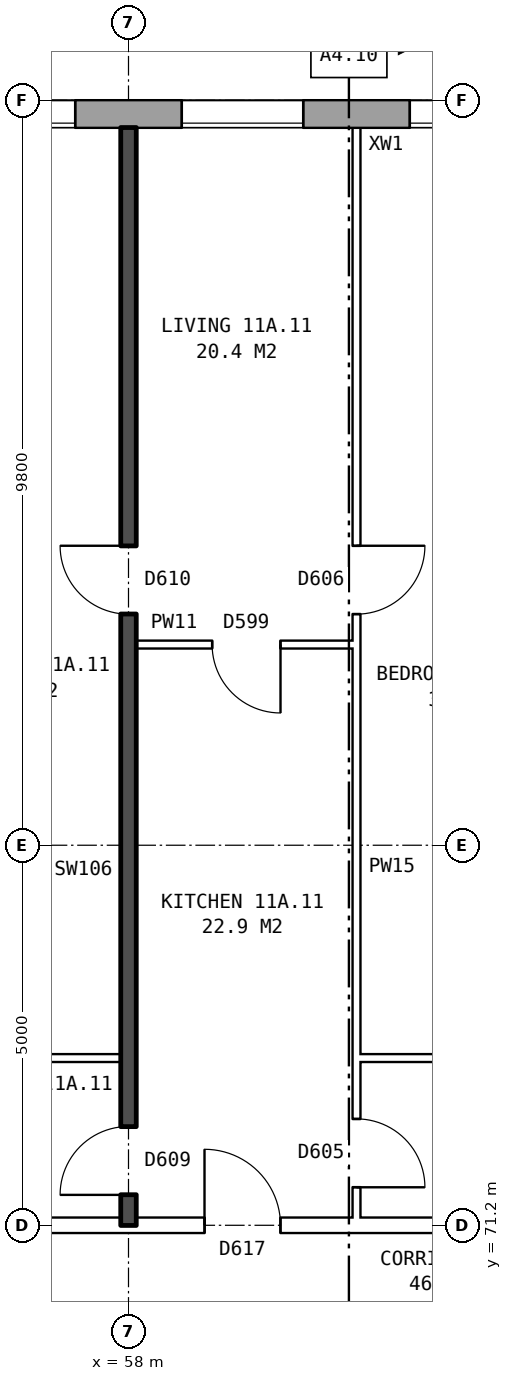
"""IFC4 building model, lengths in metres.
Left out: names, types, materials, properties, quantities, classifications, styles, units other than length and angle.
Written with IfcOpenShell. Run it as: python <this file> out.ifc"""

import sys

from ifc_helpers import new_model, si_unit, direction, frame, frame_2d, origin, place, context, subcontext, project, spatial, rectangle, extrude, element, fill, save


model = new_model("IFC4")
c1 = context("Model", 3, precision=1e-05, world=origin(), true_north=direction((0.0, 1.0)))
c2 = subcontext(c1, "Body", "Model", "MODEL_VIEW")
j1 = project(units=[si_unit("LENGTHUNIT", "METRE"), si_unit("PLANEANGLEUNIT", "RADIAN")], contexts=[c1])
p1 = place(None, origin())
s1 = spatial("IfcSite", under=j1, at=p1, CompositionType="ELEMENT")
p2 = place(p1, origin())
s2 = spatial("IfcBuilding", under=s1, at=p2, CompositionType="ELEMENT")
p3 = place(p2, frame((0.0, 0.0, 44.3)))
s3 = spatial("IfcBuildingStorey", under=s2, at=p3, CompositionType="ELEMENT", Elevation=44.3)
p4 = place(p3, frame((72.925, 85.82, 0.0), z_axis=(0.0, 0.0, 1.0), x_axis=(-1.0, 0.0, 0.0)))
e1 = element("IfcWall", 1, at=p4, inside=s3, PredefinedType="STANDARD", context=c2, shape_type="SweptSolid", body=[
    extrude(rectangle(XDim=48.351, YDim=0.36, at=frame_2d((24.175, 0.0))), origin(), (0.0, 0.0, 1.0), 2.85),
])
p5 = place(p4, frame((0.65, 0.0, 0.8)))
e2 = element("IfcOpeningElement", 2, at=p5, cuts=e1, PredefinedType="OPENING", context=c2, shape_type="SweptSolid", body=[
    extrude(rectangle(XDim=0.6, YDim=0.9, at=frame_2d((0.3, 0.45))), frame((0.0, 0.19, 0.0), z_axis=(0.0, -1.0, 0.0), x_axis=(1.0, 0.0, 0.0)), (0.0, 0.0, 1.0), 0.38),
])
p6 = place(p4, frame((3.625, 0.0, 0.8)))
e3 = element("IfcOpeningElement", 3, at=p6, cuts=e1, PredefinedType="OPENING", context=c2, shape_type="SweptSolid", body=[
    extrude(rectangle(XDim=1.6, YDim=1.8, at=frame_2d((0.8, 0.9))), frame((0.0, 0.19, 0.0), z_axis=(0.0, -1.0, 0.0), x_axis=(1.0, 0.0, 0.0)), (0.0, 0.0, 1.0), 0.38),
])
p7 = place(p4, frame((6.625, 0.0, 0.8)))
e4 = element("IfcOpeningElement", 4, at=p7, cuts=e1, PredefinedType="OPENING", context=c2, shape_type="SweptSolid", body=[
    extrude(rectangle(XDim=1.6, YDim=1.8, at=frame_2d((0.8, 0.9))), frame((0.0, 0.19, 0.0), z_axis=(0.0, -1.0, 0.0), x_axis=(1.0, 0.0, 0.0)), (0.0, 0.0, 1.0), 0.38),
])
p8 = place(p4, frame((9.625, 0.0, 0.8)))
e5 = element("IfcOpeningElement", 5, at=p8, cuts=e1, PredefinedType="OPENING", context=c2, shape_type="SweptSolid", body=[
    extrude(rectangle(XDim=1.6, YDim=1.8, at=frame_2d((0.8, 0.9))), frame((0.0, 0.19, 0.0), z_axis=(0.0, -1.0, 0.0), x_axis=(1.0, 0.0, 0.0)), (0.0, 0.0, 1.0), 0.38),
])
p9 = place(p4, frame((12.625, 0.0, 0.8)))
e6 = element("IfcOpeningElement", 6, at=p9, cuts=e1, PredefinedType="OPENING", context=c2, shape_type="SweptSolid", body=[
    extrude(rectangle(XDim=1.6, YDim=1.8, at=frame_2d((0.8, 0.9))), frame((0.0, 0.19, 0.0), z_axis=(0.0, -1.0, 0.0), x_axis=(1.0, 0.0, 0.0)), (0.0, 0.0, 1.0), 0.38),
])
p10 = place(p4, frame((15.625, 0.0, 0.8)))
e7 = element("IfcOpeningElement", 7, at=p10, cuts=e1, PredefinedType="OPENING", context=c2, shape_type="SweptSolid", body=[
    extrude(rectangle(XDim=1.6, YDim=1.8, at=frame_2d((0.8, 0.9))), frame((0.0, 0.19, 0.0), z_axis=(0.0, -1.0, 0.0), x_axis=(1.0, 0.0, 0.0)), (0.0, 0.0, 1.0), 0.38),
])
p11 = place(p4, frame((18.625, 0.0, 0.8)))
e8 = element("IfcOpeningElement", 8, at=p11, cuts=e1, PredefinedType="OPENING", context=c2, shape_type="SweptSolid", body=[
    extrude(rectangle(XDim=1.6, YDim=1.8, at=frame_2d((0.8, 0.9))), frame((0.0, 0.19, 0.0), z_axis=(0.0, -1.0, 0.0), x_axis=(1.0, 0.0, 0.0)), (0.0, 0.0, 1.0), 0.38),
])
p12 = place(p4, frame((21.625, 0.0, 0.8)))
e9 = element("IfcOpeningElement", 9, at=p12, cuts=e1, PredefinedType="OPENING", context=c2, shape_type="SweptSolid", body=[
    extrude(rectangle(XDim=1.6, YDim=1.8, at=frame_2d((0.8, 0.9))), frame((0.0, 0.19, 0.0), z_axis=(0.0, -1.0, 0.0), x_axis=(1.0, 0.0, 0.0)), (0.0, 0.0, 1.0), 0.38),
])
p13 = place(p4, frame((24.625, 0.0, 0.8)))
e10 = element("IfcOpeningElement", 10, at=p13, cuts=e1, PredefinedType="OPENING", context=c2, shape_type="SweptSolid", body=[
    extrude(rectangle(XDim=1.6, YDim=1.8, at=frame_2d((0.8, 0.9))), frame((0.0, 0.19, 0.0), z_axis=(0.0, -1.0, 0.0), x_axis=(1.0, 0.0, 0.0)), (0.0, 0.0, 1.0), 0.38),
])
p14 = place(p4, frame((27.625, 0.0, 0.8)))
e11 = element("IfcOpeningElement", 11, at=p14, cuts=e1, PredefinedType="OPENING", context=c2, shape_type="SweptSolid", body=[
    extrude(rectangle(XDim=1.6, YDim=1.8, at=frame_2d((0.8, 0.9))), frame((0.0, 0.19, 0.0), z_axis=(0.0, -1.0, 0.0), x_axis=(1.0, 0.0, 0.0)), (0.0, 0.0, 1.0), 0.38),
])
p15 = place(p4, frame((30.625, 0.0, 0.8)))
e12 = element("IfcOpeningElement", 12, at=p15, cuts=e1, PredefinedType="OPENING", context=c2, shape_type="SweptSolid", body=[
    extrude(rectangle(XDim=1.6, YDim=1.8, at=frame_2d((0.8, 0.9))), frame((0.0, 0.19, 0.0), z_axis=(0.0, -1.0, 0.0), x_axis=(1.0, 0.0, 0.0)), (0.0, 0.0, 1.0), 0.38),
])
p16 = place(p4, frame((33.625, 0.0, 0.8)))
e13 = element("IfcOpeningElement", 13, at=p16, cuts=e1, PredefinedType="OPENING", context=c2, shape_type="SweptSolid", body=[
    extrude(rectangle(XDim=1.6, YDim=1.8, at=frame_2d((0.8, 0.9))), frame((0.0, 0.19, 0.0), z_axis=(0.0, -1.0, 0.0), x_axis=(1.0, 0.0, 0.0)), (0.0, 0.0, 1.0), 0.38),
])
p17 = place(p4, frame((36.625, 0.0, 0.8)))
e14 = element("IfcOpeningElement", 14, at=p17, cuts=e1, PredefinedType="OPENING", context=c2, shape_type="SweptSolid", body=[
    extrude(rectangle(XDim=1.6, YDim=1.8, at=frame_2d((0.8, 0.9))), frame((0.0, 0.19, 0.0), z_axis=(0.0, -1.0, 0.0), x_axis=(1.0, 0.0, 0.0)), (0.0, 0.0, 1.0), 0.38),
])
p18 = place(p4, frame((39.625, 0.0, 0.8)))
e15 = element("IfcOpeningElement", 15, at=p18, cuts=e1, PredefinedType="OPENING", context=c2, shape_type="SweptSolid", body=[
    extrude(rectangle(XDim=1.6, YDim=1.8, at=frame_2d((0.8, 0.9))), frame((0.0, 0.19, 0.0), z_axis=(0.0, -1.0, 0.0), x_axis=(1.0, 0.0, 0.0)), (0.0, 0.0, 1.0), 0.38),
])
p19 = place(p4, frame((42.625, 0.0, 0.8)))
e16 = element("IfcOpeningElement", 16, at=p19, cuts=e1, PredefinedType="OPENING", context=c2, shape_type="SweptSolid", body=[
    extrude(rectangle(XDim=1.6, YDim=1.8, at=frame_2d((0.8, 0.9))), frame((0.0, 0.19, 0.0), z_axis=(0.0, -1.0, 0.0), x_axis=(1.0, 0.0, 0.0)), (0.0, 0.0, 1.0), 0.38),
])
p20 = place(p4, frame((45.125, 0.0, 0.8)))
e17 = element("IfcOpeningElement", 17, at=p20, cuts=e1, PredefinedType="OPENING", context=c2, shape_type="SweptSolid", body=[
    extrude(rectangle(XDim=1.2, YDim=1.8, at=frame_2d((0.6, 0.9))), frame((0.0, 0.19, 0.0), z_axis=(0.0, -1.0, 0.0), x_axis=(1.0, 0.0, 0.0)), (0.0, 0.0, 1.0), 0.38),
])
p21 = place(p4, frame((1.55, 0.0, 0.8)))
e18 = element("IfcOpeningElement", 18, at=p21, cuts=e1, PredefinedType="OPENING", context=c2, shape_type="SweptSolid", body=[
    extrude(rectangle(XDim=1.0, YDim=1.5, at=frame_2d((0.5, 0.75))), frame((0.0, 0.19, 0.0), z_axis=(0.0, -1.0, 0.0), x_axis=(1.0, 0.0, 0.0)), (0.0, 0.0, 1.0), 0.38),
])
p22 = place(p4, frame((46.625, 0.0, 0.8)))
e19 = element("IfcOpeningElement", 19, at=p22, cuts=e1, PredefinedType="OPENING", context=c2, shape_type="SweptSolid", body=[
    extrude(rectangle(XDim=1.0, YDim=0.9, at=frame_2d((0.5, 0.45))), frame((0.0, 0.19, 0.0), z_axis=(0.0, -1.0, 0.0), x_axis=(1.0, 0.0, 0.0)), (0.0, 0.0, 1.0), 0.38),
])
p23 = place(p3, frame((44.36, 71.2, 0.0), z_axis=(0.0, 0.0, 1.0), x_axis=(1.0, 0.0, 0.0)))
e20 = element("IfcWall", 20, at=p23, inside=s3, PredefinedType="PARTITIONING", context=c2, shape_type="SweptSolid", body=[
    extrude(rectangle(XDim=19.28, YDim=0.2, at=frame_2d((9.64, 0.0))), origin(), (0.0, 0.0, 1.0), 2.85),
])
p24 = place(p23, frame((14.64, 0.0, 0.0)))
e21 = element("IfcOpeningElement", 21, at=p24, cuts=e20, PredefinedType="OPENING", context=c2, shape_type="SweptSolid", body=[
    extrude(rectangle(XDim=1.0, YDim=2.1, at=frame_2d((0.5, 1.05))), frame((0.0, 0.11, 0.0), z_axis=(0.0, -1.0, 0.0), x_axis=(1.0, 0.0, 0.0)), (0.0, 0.0, 1.0), 0.22),
])
p25 = place(p23, frame((5.64, 0.0, 0.0)))
e22 = element("IfcOpeningElement", 22, at=p25, cuts=e20, PredefinedType="OPENING", context=c2, shape_type="SweptSolid", body=[
    extrude(rectangle(XDim=1.0, YDim=2.1, at=frame_2d((0.5, 1.05))), frame((0.0, 0.11, 0.0), z_axis=(0.0, -1.0, 0.0), x_axis=(1.0, 0.0, 0.0)), (0.0, 0.0, 1.0), 0.22),
])
p26 = place(p3, frame((52.1, 73.4, 0.0), z_axis=(0.0, 0.0, 1.0), x_axis=(1.0, 0.0, 0.0)))
e23 = element("IfcWall", 23, at=p26, inside=s3, PredefinedType="PARTITIONING", context=c2, shape_type="SweptSolid", body=[
    extrude(rectangle(XDim=5.8, YDim=0.1, at=frame_2d((2.9, 0.0))), origin(), (0.0, 0.0, 1.0), 2.85),
])
p27 = place(p3, frame((61.0, 73.4, 0.0), z_axis=(0.0, 0.0, 1.0), x_axis=(1.0, 0.0, 0.0)))
e24 = element("IfcWall", 24, at=p27, inside=s3, PredefinedType="PARTITIONING", context=c2, shape_type="SweptSolid", body=[
    extrude(rectangle(XDim=2.64, YDim=0.1, at=frame_2d((1.32, 0.0))), origin(), (0.0, 0.0, 1.0), 2.85),
])
p28 = place(p3, frame((58.1, 78.84, 0.0), z_axis=(0.0, 0.0, 1.0), x_axis=(1.0, 0.0, 0.0)))
e25 = element("IfcWall", 25, at=p28, inside=s3, PredefinedType="PARTITIONING", context=c2, shape_type="SweptSolid", body=[
    extrude(rectangle(XDim=2.9, YDim=0.1, at=frame_2d((1.45, 0.0))), origin(), (0.0, 0.0, 1.0), 2.85),
])
p29 = place(p28, frame((1.0, 0.0, 0.0)))
e26 = element("IfcOpeningElement", 26, at=p29, cuts=e25, PredefinedType="OPENING", context=c2, shape_type="SweptSolid", body=[
    extrude(rectangle(XDim=0.9, YDim=2.1, at=frame_2d((0.45, 1.05))), frame((0.0, 0.06, 0.0), z_axis=(0.0, -1.0, 0.0), x_axis=(1.0, 0.0, 0.0)), (0.0, 0.0, 1.0), 0.12),
])
p30 = place(p3, frame((58.0, 71.2, 0.0), z_axis=(0.0, 0.0, 1.0), x_axis=(0.0, 1.0, 0.0)))
e27 = element("IfcWall", 27, at=p30, inside=s3, PredefinedType="SOLIDWALL", context=c2, shape_type="SweptSolid", body=[
    extrude(rectangle(XDim=14.44, YDim=0.2, at=frame_2d((7.22, 0.0))), origin(), (0.0, 0.0, 1.0), 2.85),
])
p31 = place(p30, frame((8.04, 0.0, 0.0)))
e28 = element("IfcOpeningElement", 28, at=p31, cuts=e27, PredefinedType="OPENING", context=c2, shape_type="SweptSolid", body=[
    extrude(rectangle(XDim=0.9, YDim=2.1, at=frame_2d((0.45, 1.05))), frame((0.0, 0.11, 0.0), z_axis=(0.0, -1.0, 0.0), x_axis=(1.0, 0.0, 0.0)), (0.0, 0.0, 1.0), 0.22),
])
p32 = place(p30, frame((0.4, 0.0, 0.0)))
e29 = element("IfcOpeningElement", 29, at=p32, cuts=e27, PredefinedType="OPENING", context=c2, shape_type="SweptSolid", body=[
    extrude(rectangle(XDim=0.9, YDim=2.1, at=frame_2d((0.45, 1.05))), frame((0.0, 0.11, 0.0), z_axis=(0.0, -1.0, 0.0), x_axis=(1.0, 0.0, 0.0)), (0.0, 0.0, 1.0), 0.22),
])
p33 = place(p3, frame((61.0, 71.3, 0.0), z_axis=(0.0, 0.0, 1.0), x_axis=(0.0, 1.0, 0.0)))
e30 = element("IfcWall", 30, at=p33, inside=s3, PredefinedType="PARTITIONING", context=c2, shape_type="SweptSolid", body=[
    extrude(rectangle(XDim=14.34, YDim=0.1, at=frame_2d((7.17, 0.0))), origin(), (0.0, 0.0, 1.0), 2.85),
])
p34 = place(p33, frame((7.94, 0.0, 0.0)))
e31 = element("IfcOpeningElement", 31, at=p34, cuts=e30, PredefinedType="OPENING", context=c2, shape_type="SweptSolid", body=[
    extrude(rectangle(XDim=0.9, YDim=2.1, at=frame_2d((0.45, 1.05))), frame((0.0, 0.06, 0.0), z_axis=(0.0, -1.0, 0.0), x_axis=(1.0, 0.0, 0.0)), (0.0, 0.0, 1.0), 0.12),
])
p35 = place(p33, frame((0.4, 0.0, 0.0)))
e32 = element("IfcOpeningElement", 32, at=p35, cuts=e30, PredefinedType="OPENING", context=c2, shape_type="SweptSolid", body=[
    extrude(rectangle(XDim=0.9, YDim=2.1, at=frame_2d((0.45, 1.05))), frame((0.0, 0.06, 0.0), z_axis=(0.0, -1.0, 0.0), x_axis=(1.0, 0.0, 0.0)), (0.0, 0.0, 1.0), 0.12),
])
p36 = place(p8, origin())
e33 = element("IfcWindow", 33, at=p36, inside=s3, PartitioningType="SINGLE_PANEL", PredefinedType="WINDOW", context=c2, shape_type="SweptSolid", body=[
    extrude(rectangle(XDim=1.6, YDim=1.8, at=frame_2d((0.8, 0.9))), frame((0.0, 0.15, 0.0), z_axis=(0.0, -1.0, 0.0), x_axis=(1.0, 0.0, 0.0)), (0.0, 0.0, 1.0), 0.06),
])
fill(e5, e33)
p37 = place(p9, origin())
e34 = element("IfcWindow", 34, at=p37, inside=s3, PartitioningType="SINGLE_PANEL", PredefinedType="WINDOW", context=c2, shape_type="SweptSolid", body=[
    extrude(rectangle(XDim=1.6, YDim=1.8, at=frame_2d((0.8, 0.9))), frame((0.0, 0.15, 0.0), z_axis=(0.0, -1.0, 0.0), x_axis=(1.0, 0.0, 0.0)), (0.0, 0.0, 1.0), 0.06),
])
fill(e6, e34)
p38 = place(p10, origin())
e35 = element("IfcWindow", 35, at=p38, inside=s3, PartitioningType="SINGLE_PANEL", PredefinedType="WINDOW", context=c2, shape_type="SweptSolid", body=[
    extrude(rectangle(XDim=1.6, YDim=1.8, at=frame_2d((0.8, 0.9))), frame((0.0, 0.15, 0.0), z_axis=(0.0, -1.0, 0.0), x_axis=(1.0, 0.0, 0.0)), (0.0, 0.0, 1.0), 0.06),
])
fill(e7, e35)
p39 = place(p34, frame((0.9, 0.0, 0.0), z_axis=(0.0, 0.0, 1.0), x_axis=(-1.0, 0.0, 0.0)))
e36 = element("IfcDoor", 36, at=p39, inside=s3, OperationType="SINGLE_SWING_LEFT", PredefinedType="DOOR", context=c2, shape_type="SweptSolid", body=[
    extrude(rectangle(XDim=0.9, YDim=2.1, at=frame_2d((0.45, 1.05))), frame((0.0, 0.025, 0.0), z_axis=(0.0, -1.0, 0.0), x_axis=(1.0, 0.0, 0.0)), (0.0, 0.0, 1.0), 0.05),
])
fill(e31, e36)
p40 = place(p31, origin())
e37 = element("IfcDoor", 37, at=p40, inside=s3, OperationType="SINGLE_SWING_RIGHT", PredefinedType="DOOR", context=c2, shape_type="SweptSolid", body=[
    extrude(rectangle(XDim=0.9, YDim=2.1, at=frame_2d((0.45, 1.05))), frame((0.0, 0.025, 0.0), z_axis=(0.0, -1.0, 0.0), x_axis=(1.0, 0.0, 0.0)), (0.0, 0.0, 1.0), 0.05),
])
fill(e28, e37)
p41 = place(p24, origin())
e38 = element("IfcDoor", 38, at=p41, inside=s3, OperationType="SINGLE_SWING_LEFT", PredefinedType="DOOR", context=c2, shape_type="SweptSolid", body=[
    extrude(rectangle(XDim=1.0, YDim=2.1, at=frame_2d((0.5, 1.05))), frame((0.0, 0.025, 0.0), z_axis=(0.0, -1.0, 0.0), x_axis=(1.0, 0.0, 0.0)), (0.0, 0.0, 1.0), 0.05),
])
fill(e21, e38)
p42 = place(p29, frame((0.9, 0.0, 0.0), z_axis=(0.0, 0.0, 1.0), x_axis=(-1.0, 0.0, 0.0)))
e39 = element("IfcDoor", 39, at=p42, inside=s3, OperationType="SINGLE_SWING_LEFT", PredefinedType="DOOR", context=c2, shape_type="SweptSolid", body=[
    extrude(rectangle(XDim=0.9, YDim=2.1, at=frame_2d((0.45, 1.05))), frame((0.0, 0.025, 0.0), z_axis=(0.0, -1.0, 0.0), x_axis=(1.0, 0.0, 0.0)), (0.0, 0.0, 1.0), 0.05),
])
fill(e26, e39)
p43 = place(p35, frame((0.9, 0.0, 0.0), z_axis=(0.0, 0.0, 1.0), x_axis=(-1.0, 0.0, 0.0)))
e40 = element("IfcDoor", 40, at=p43, inside=s3, OperationType="SINGLE_SWING_RIGHT", PredefinedType="DOOR", context=c2, shape_type="SweptSolid", body=[
    extrude(rectangle(XDim=0.9, YDim=2.1, at=frame_2d((0.45, 1.05))), frame((0.0, 0.025, 0.0), z_axis=(0.0, -1.0, 0.0), x_axis=(1.0, 0.0, 0.0)), (0.0, 0.0, 1.0), 0.05),
])
fill(e32, e40)
p44 = place(p32, origin())
e41 = element("IfcDoor", 41, at=p44, inside=s3, OperationType="SINGLE_SWING_LEFT", PredefinedType="DOOR", context=c2, shape_type="SweptSolid", body=[
    extrude(rectangle(XDim=0.9, YDim=2.1, at=frame_2d((0.45, 1.05))), frame((0.0, 0.025, 0.0), z_axis=(0.0, -1.0, 0.0), x_axis=(1.0, 0.0, 0.0)), (0.0, 0.0, 1.0), 0.05),
])
fill(e29, e41)
save(model, sys.argv[1])
